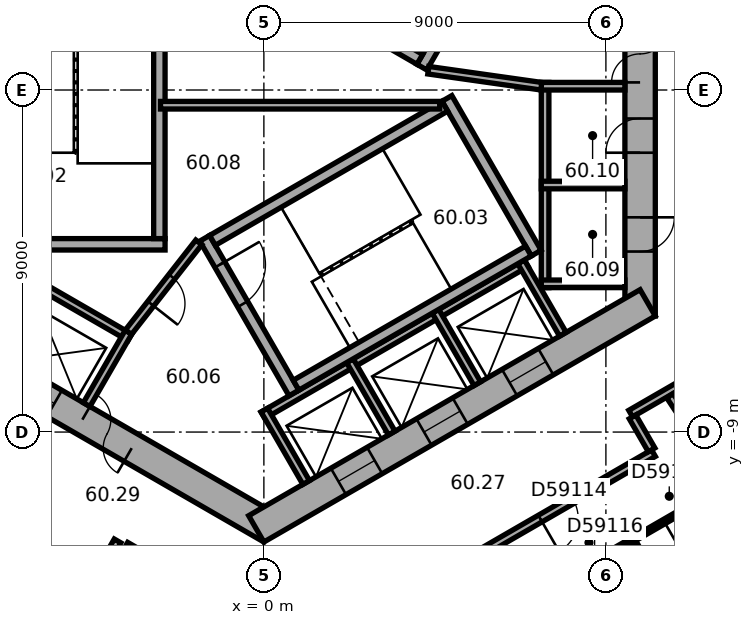
"""IFC4 building model, lengths in metres.
Left out: names, types, materials, properties, quantities, classifications, styles, units other than length and angle.
Written with IfcOpenShell. Run it as: python <this file> out.ifc"""

import sys

from ifc_helpers import new_model, si_unit, direction, frame, frame_2d, origin, place, context, subcontext, project, spatial, rectangle, extrude, element, fill, save


model = new_model("IFC4")
c1 = context("Model", 3, precision=1e-05, world=origin(), true_north=direction((0.0, 1.0)))
c2 = subcontext(c1, "Body", "Model", "MODEL_VIEW")
j1 = project(units=[si_unit("LENGTHUNIT", "METRE"), si_unit("PLANEANGLEUNIT", "RADIAN")], contexts=[c1])
p1 = place(None, origin())
s1 = spatial("IfcSite", under=j1, at=p1, CompositionType="ELEMENT")
p2 = place(p1, origin())
s2 = spatial("IfcBuilding", under=s1, at=p2, CompositionType="ELEMENT")
p3 = place(p2, frame((0.0, 0.0, 243.9)))
s3 = spatial("IfcBuildingStorey", under=s2, at=p3, CompositionType="ELEMENT", Elevation=243.9)
p4 = place(p3, frame((9.9, -5.947, 0.0), z_axis=(0.0, 0.0, 1.0), x_axis=(0.0, 1.0, 0.0)))
e1 = element("IfcWall", 1, at=p4, inside=s3, PredefinedType="SHEAR", context=c2, shape_type="SweptSolid", body=[
    extrude(rectangle(XDim=11.894, YDim=0.8, at=frame_2d((5.947, 0.0))), origin(), (0.0, 0.0, 1.0), 3.7),
])
p5 = place(p4, frame((6.147, 0.0, 0.0)))
e2 = element("IfcOpeningElement", 2, at=p5, cuts=e1, PredefinedType="OPENING", context=c2, shape_type="SweptSolid", body=[
    extrude(rectangle(XDim=1.5, YDim=2.1, at=frame_2d((0.75, 1.05))), frame((0.0, 0.41, 0.0), z_axis=(0.0, -1.0, 0.0), x_axis=(1.0, 0.0, 0.0)), (0.0, 0.0, 1.0), 0.82),
])
p6 = place(p4, frame((1.697, 0.0, 0.0)))
e3 = element("IfcOpeningElement", 3, at=p6, cuts=e1, PredefinedType="OPENING", context=c2, shape_type="SweptSolid", body=[
    extrude(rectangle(XDim=0.9, YDim=2.1, at=frame_2d((0.45, 1.05))), frame((0.0, 0.41, 0.0), z_axis=(0.0, -1.0, 0.0), x_axis=(1.0, 0.0, 0.0)), (0.0, 0.0, 1.0), 0.82),
])
p7 = place(p4, frame((4.297, 0.0, 0.0)))
e4 = element("IfcOpeningElement", 4, at=p7, cuts=e1, PredefinedType="OPENING", context=c2, shape_type="SweptSolid", body=[
    extrude(rectangle(XDim=0.9, YDim=2.1, at=frame_2d((0.45, 1.05))), frame((0.0, 0.41, 0.0), z_axis=(0.0, -1.0, 0.0), x_axis=(1.0, 0.0, 0.0)), (0.0, 0.0, 1.0), 0.82),
])
p8 = place(p3, frame((-10.1, -5.6, 0.0), z_axis=(0.0, 0.0, 1.0), x_axis=(0.866023897231, -0.500002609418, 0.0)))
e5 = element("IfcWall", 5, at=p8, inside=s3, PredefinedType="SHEAR", context=c2, shape_type="SweptSolid", body=[
    extrude(rectangle(XDim=11.894, YDim=0.8, at=frame_2d((5.947, 0.0))), origin(), (0.0, 0.0, 1.0), 3.7),
])
p9 = place(p8, frame((6.147, 0.0, 0.0)))
e6 = element("IfcOpeningElement", 6, at=p9, cuts=e5, PredefinedType="OPENING", context=c2, shape_type="SweptSolid", body=[
    extrude(rectangle(XDim=1.5, YDim=2.1, at=frame_2d((0.75, 1.05))), frame((0.0, 0.41, 0.0), z_axis=(0.0, -1.0, 0.0), x_axis=(1.0, 0.0, 0.0)), (0.0, 0.0, 1.0), 0.82),
])
p10 = place(p8, frame((1.597, 0.0, 0.0)))
e7 = element("IfcOpeningElement", 7, at=p10, cuts=e5, PredefinedType="OPENING", context=c2, shape_type="SweptSolid", body=[
    extrude(rectangle(XDim=1.1, YDim=2.1, at=frame_2d((0.55, 1.05))), frame((0.0, 0.41, 0.0), z_axis=(0.0, -1.0, 0.0), x_axis=(1.0, 0.0, 0.0)), (0.0, 0.0, 1.0), 0.82),
])
p11 = place(p8, frame((4.197, 0.0, 0.0)))
e8 = element("IfcOpeningElement", 8, at=p11, cuts=e5, PredefinedType="OPENING", context=c2, shape_type="SweptSolid", body=[
    extrude(rectangle(XDim=1.1, YDim=2.1, at=frame_2d((0.55, 1.05))), frame((0.0, 0.41, 0.0), z_axis=(0.0, -1.0, 0.0), x_axis=(1.0, 0.0, 0.0)), (0.0, 0.0, 1.0), 0.82),
])
p12 = place(p3, frame((-0.2, -11.547, 0.0), z_axis=(0.0, 0.0, 1.0), x_axis=(0.866023897231, 0.500002609418, 0.0)))
e9 = element("IfcWall", 9, at=p12, inside=s3, PredefinedType="SHEAR", context=c2, shape_type="SweptSolid", body=[
    extrude(rectangle(XDim=11.894, YDim=0.8, at=frame_2d((5.947, 0.0))), origin(), (0.0, 0.0, 1.0), 3.7),
])
p13 = place(p12, frame((2.497, 0.0, 0.0)))
e10 = element("IfcOpeningElement", 10, at=p13, cuts=e9, PredefinedType="OPENING", context=c2, shape_type="SweptSolid", body=[
    extrude(rectangle(XDim=1.1, YDim=2.1, at=frame_2d((0.55, 1.05))), frame((0.0, 0.41, 0.0), z_axis=(0.0, -1.0, 0.0), x_axis=(1.0, 0.0, 0.0)), (0.0, 0.0, 1.0), 0.82),
])
p14 = place(p12, frame((5.097, 0.0, 0.0)))
e11 = element("IfcOpeningElement", 11, at=p14, cuts=e9, PredefinedType="OPENING", context=c2, shape_type="SweptSolid", body=[
    extrude(rectangle(XDim=1.1, YDim=2.1, at=frame_2d((0.55, 1.05))), frame((0.0, 0.41, 0.0), z_axis=(0.0, -1.0, 0.0), x_axis=(1.0, 0.0, 0.0)), (0.0, 0.0, 1.0), 0.82),
])
p15 = place(p12, frame((7.697, 0.0, 0.0)))
e12 = element("IfcOpeningElement", 12, at=p15, cuts=e9, PredefinedType="OPENING", context=c2, shape_type="SweptSolid", body=[
    extrude(rectangle(XDim=1.1, YDim=2.1, at=frame_2d((0.55, 1.05))), frame((0.0, 0.41, 0.0), z_axis=(0.0, -1.0, 0.0), x_axis=(1.0, 0.0, 0.0)), (0.0, 0.0, 1.0), 0.82),
])
p16 = place(p3, frame((7.4, -5.2, 0.0), z_axis=(0.0, 0.0, 1.0), x_axis=(0.0, 1.0, 0.0)))
e13 = element("IfcWall", 13, at=p16, inside=s3, PredefinedType="PARTITIONING", context=c2, shape_type="SweptSolid", body=[
    extrude(rectangle(XDim=5.4, YDim=0.2, at=frame_2d((2.7, 0.0))), origin(), (0.0, 0.0, 1.0), 3.42),
])
for number, where, z_axis, x_axis in (
    (14, (7.3, -5.1, 0.0), (0.0, 0.0, 1.0), (1.0, 0.0, 0.0)),
    (15, (7.3, -2.5, 0.0), (0.0, 0.0, 1.0), (1.0, 0.0, 0.0)),
    (16, (7.3, 0.1, 0.0), (0.0, 0.0, 1.0), (1.0, 0.0, 0.0)),
):
    element("IfcWall", number, at=place(p3, frame(where, z_axis=z_axis, x_axis=x_axis)), inside=s3, PredefinedType="PARTITIONING", context=c2, shape_type="SweptSolid", body=[
        extrude(rectangle(XDim=2.2, YDim=0.2, at=frame_2d((1.1, 0.0))), origin(), (0.0, 0.0, 1.0), 3.42),
    ])
p17 = place(p3, frame((-8.203, -3.809, 0.0), z_axis=(0.0, 0.0, 1.0), x_axis=(0.866028230842, -0.499995103361, 0.0)))
e17 = element("IfcWall", 17, at=p17, inside=s3, PredefinedType="PARTITIONING", context=c2, shape_type="SweptSolid", body=[
    extrude(rectangle(XDim=5.4, YDim=0.2, at=frame_2d((2.7, 0.0))), origin(), (0.0, 0.0, 1.0), 3.42),
])
p18 = place(p3, frame((-3.563, -6.372, 0.0), z_axis=(0.0, 0.0, 1.0), x_axis=(-0.499994660107, -0.866028486751, 0.0)))
e18 = element("IfcWall", 18, at=p18, inside=s3, PredefinedType="PARTITIONING", context=c2, shape_type="SweptSolid", body=[
    extrude(rectangle(XDim=2.2, YDim=0.2, at=frame_2d((1.1, 0.0))), origin(), (0.0, 0.0, 1.0), 3.42),
])
p19 = place(p3, frame((-0.024, -8.559, 0.0), z_axis=(0.0, 0.0, 1.0), x_axis=(0.866026010844, 0.49999894854, 0.0)))
e19 = element("IfcWall", 19, at=p19, inside=s3, PredefinedType="PARTITIONING", context=c2, shape_type="SweptSolid", body=[
    extrude(rectangle(XDim=8.0, YDim=0.2, at=frame_2d((4.0, 0.0))), origin(), (0.0, 0.0, 1.0), 3.42),
])
for number, where, z_axis, x_axis in (
    (20, (0.013, -8.422, 0.0), (0.0, 0.0, 1.0), (0.5, -0.866, 0.0)),
    (21, (2.264, -7.122, 0.0), (0.0, 0.0, 1.0), (0.5, -0.866, 0.0)),
    (22, (4.516, -5.822, 0.0), (0.0, 0.0, 1.0), (0.5, -0.866, 0.0)),
    (23, (6.768, -4.522, 0.0), (0.0, 0.0, 1.0), (0.5, -0.866, 0.0)),
):
    element("IfcWall", number, at=place(p3, frame(where, z_axis=z_axis, x_axis=x_axis)), inside=s3, PredefinedType="PARTITIONING", context=c2, shape_type="SweptSolid", body=[
        extrude(rectangle(XDim=2.2, YDim=0.2, at=frame_2d((1.1, 0.0))), origin(), (0.0, 0.0, 1.0), 3.42),
    ])
p20 = place(p3, frame((4.158, 0.602, 0.0), z_axis=(0.0, 0.0, 1.0), x_axis=(0.499977259774, 0.866038532462, 0.0)))
e24 = element("IfcWall", 24, at=p20, inside=s3, PredefinedType="SHEAR", context=c2, shape_type="SweptSolid", body=[
    extrude(rectangle(XDim=4.7, YDim=0.3, at=frame_2d((2.35, 0.0))), origin(), (0.0, 0.0, 1.0), 3.42),
])
p21 = place(p20, frame((0.8, 0.0, 0.0)))
e25 = element("IfcOpeningElement", 25, at=p21, cuts=e24, PredefinedType="OPENING", context=c2, shape_type="SweptSolid", body=[
    extrude(rectangle(XDim=1.2, YDim=2.1, at=frame_2d((0.6, 1.05))), frame((0.0, 0.16, 0.0), z_axis=(0.0, -1.0, 0.0), x_axis=(1.0, 0.0, 0.0)), (0.0, 0.0, 1.0), 0.32),
])
p22 = place(p3, frame((4.103, 0.807, 0.0), z_axis=(0.0, 0.0, 1.0), x_axis=(-0.866027801685, 0.499995846692, 0.0)))
e26 = element("IfcWall", 26, at=p22, inside=s3, PredefinedType="SHEAR", context=c2, shape_type="SweptSolid", body=[
    extrude(rectangle(XDim=7.06, YDim=0.3, at=frame_2d((3.53, 0.0))), origin(), (0.0, 0.0, 1.0), 3.42),
])
p23 = place(p3, frame((-2.6, -4.06, 0.0), z_axis=(0.0, 0.0, 1.0), x_axis=(-1.0, 0.0, 0.0)))
e27 = element("IfcWall", 27, at=p23, inside=s3, PredefinedType="SHEAR", context=c2, shape_type="SweptSolid", body=[
    extrude(rectangle(XDim=4.7, YDim=0.3, at=frame_2d((2.35, 0.0))), origin(), (0.0, 0.0, 1.0), 3.42),
])
p24 = place(p3, frame((-2.75, 3.15, 0.0), z_axis=(0.0, 0.0, 1.0), x_axis=(0.0, -1.0, 0.0)))
e28 = element("IfcWall", 28, at=p24, inside=s3, PredefinedType="SHEAR", context=c2, shape_type="SweptSolid", body=[
    extrude(rectangle(XDim=7.06, YDim=0.3, at=frame_2d((3.53, 0.0))), origin(), (0.0, 0.0, 1.0), 3.42),
])
p25 = place(p3, frame((-1.558, -3.902, 0.0), z_axis=(0.0, 0.0, 1.0), x_axis=(0.499977259774, -0.866038532462, 0.0)))
e29 = element("IfcWall", 29, at=p25, inside=s3, PredefinedType="SHEAR", context=c2, shape_type="SweptSolid", body=[
    extrude(rectangle(XDim=4.7, YDim=0.3, at=frame_2d((2.35, 0.0))), origin(), (0.0, 0.0, 1.0), 3.42),
])
p26 = place(p25, frame((0.8, 0.0, 0.0)))
e30 = element("IfcOpeningElement", 30, at=p26, cuts=e29, PredefinedType="OPENING", context=c2, shape_type="SweptSolid", body=[
    extrude(rectangle(XDim=1.2, YDim=2.1, at=frame_2d((0.6, 1.05))), frame((0.0, 0.16, 0.0), z_axis=(0.0, -1.0, 0.0), x_axis=(1.0, 0.0, 0.0)), (0.0, 0.0, 1.0), 0.32),
])
p27 = place(p3, frame((4.816, -0.222, 0.0), z_axis=(0.0, 0.0, 1.0), x_axis=(0.499977259774, -0.866038532462, 0.0)))
e31 = element("IfcWall", 31, at=p27, inside=s3, PredefinedType="SHEAR", context=c2, shape_type="SweptSolid", body=[
    extrude(rectangle(XDim=4.7, YDim=0.3, at=frame_2d((2.35, 0.0))), origin(), (0.0, 0.0, 1.0), 3.42),
])
for number, where, z_axis, x_axis in (
    (32, (-1.353, -3.957, 0.0), (0.0, 0.0, 1.0), (0.866, 0.5, 0.0)),
    (33, (0.847, -7.767, 0.0), (0.0, 0.0, 1.0), (0.866, 0.5, 0.0)),
):
    element("IfcWall", number, at=place(p3, frame(where, z_axis=z_axis, x_axis=x_axis)), inside=s3, PredefinedType="SHEAR", context=c2, shape_type="SweptSolid", body=[
        extrude(rectangle(XDim=7.06, YDim=0.3, at=frame_2d((3.53, 0.0))), origin(), (0.0, 0.0, 1.0), 3.42),
    ])
p28 = place(p3, frame((4.327, 0.521, 0.0), z_axis=(0.0, 0.0, 1.0), x_axis=(0.990124376366, -0.14019172346, 0.0)))
e34 = element("IfcWall", 34, at=p28, inside=s3, PredefinedType="PARTITIONING", context=c2, shape_type="SweptSolid", body=[
    extrude(rectangle(XDim=3.002, YDim=0.2, at=frame_2d((1.501, 0.0))), origin(), (0.0, 0.0, 1.0), 3.42),
])
p29 = place(p3, frame((-1.712, -4.008, 0.0), z_axis=(0.0, 0.0, 1.0), x_axis=(-0.616549420702, -0.787316208287, 0.0)))
e35 = element("IfcWall", 35, at=p29, inside=s3, PredefinedType="PARTITIONING", context=c2, shape_type="SweptSolid", body=[
    extrude(rectangle(XDim=3.002, YDim=0.2, at=frame_2d((1.501, 0.0))), origin(), (0.0, 0.0, 1.0), 3.42),
])
p30 = place(p29, frame((1.15, 0.0, 0.0)))
e36 = element("IfcOpeningElement", 36, at=p30, cuts=e35, PredefinedType="OPENING", context=c2, shape_type="SweptSolid", body=[
    extrude(rectangle(XDim=0.9, YDim=2.1, at=frame_2d((0.45, 1.05))), frame((0.0, 0.11, 0.0), z_axis=(0.0, -1.0, 0.0), x_axis=(1.0, 0.0, 0.0)), (0.0, 0.0, 1.0), 0.22),
])
p31 = place(p3, frame((-2.72, -0.4, 0.0), z_axis=(0.0, 0.0, 1.0), x_axis=(1.0, 0.0, 0.0)))
e37 = element("IfcWall", 37, at=p31, inside=s3, PredefinedType="PARTITIONING", context=c2, shape_type="SweptSolid", body=[
    extrude(rectangle(XDim=7.347, YDim=0.2, at=frame_2d((3.674, 0.0))), origin(), (0.0, 0.0, 1.0), 3.42),
])
p32 = place(p3, frame((-7.525, -18.23, 0.0), z_axis=(0.0, 0.0, 1.0), x_axis=(0.499983153418, 0.866035129944, 0.0)))
e38 = element("IfcWall", 38, at=p32, inside=s3, PredefinedType="PARTITIONING", context=c2, shape_type="SweptSolid", body=[
    extrude(rectangle(XDim=7.35, YDim=0.2, at=frame_2d((3.675, 0.0))), origin(), (0.0, 0.0, 1.0), 3.42),
])
p33 = place(p32, frame((3.175, 0.0, 0.0)))
e39 = element("IfcOpeningElement", 39, at=p33, cuts=e38, PredefinedType="OPENING", context=c2, shape_type="SweptSolid", body=[
    extrude(rectangle(XDim=1.0, YDim=2.1, at=frame_2d((0.5, 1.05))), frame((0.0, 0.11, 0.0), z_axis=(0.0, -1.0, 0.0), x_axis=(1.0, 0.0, 0.0)), (0.0, 0.0, 1.0), 0.22),
])
p34 = place(p3, frame((-3.634, -11.99, 0.0), z_axis=(0.0, 0.0, 1.0), x_axis=(0.866033392248, -0.499986163319, 0.0)))
e40 = element("IfcWall", 40, at=p34, inside=s3, PredefinedType="PARTITIONING", context=c2, shape_type="SweptSolid", body=[
    extrude(rectangle(XDim=3.099, YDim=0.2, at=frame_2d((1.549, 0.0))), origin(), (0.0, 0.0, 1.0), 3.42),
])
p35 = place(p3, frame((2.716, -13.906, 0.0), z_axis=(0.0, 0.0, 1.0), x_axis=(0.866040290674, 0.499974214264, 0.0)))
e41 = element("IfcWall", 41, at=p35, inside=s3, PredefinedType="PARTITIONING", context=c2, shape_type="SweptSolid", body=[
    extrude(rectangle(XDim=8.702, YDim=0.2, at=frame_2d((4.351, 0.0))), origin(), (0.0, 0.0, 1.0), 3.42),
])
p36 = place(p35, frame((5.26, 0.0, 0.0)))
e42 = element("IfcOpeningElement", 42, at=p36, cuts=e41, PredefinedType="OPENING", context=c2, shape_type="SweptSolid", body=[
    extrude(rectangle(XDim=1.0, YDim=2.1, at=frame_2d((0.5, 1.05))), frame((0.0, 0.11, 0.0), z_axis=(0.0, -1.0, 0.0), x_axis=(1.0, 0.0, 0.0)), (0.0, 0.0, 1.0), 0.22),
])
p37 = place(p3, frame((6.183, -13.867, 0.0), z_axis=(0.0, 0.0, 1.0), x_axis=(0.866031365477, 0.499989673903, 0.0)))
e43 = element("IfcWall", 43, at=p37, inside=s3, PredefinedType="PARTITIONING", context=c2, shape_type="SweptSolid", body=[
    extrude(rectangle(XDim=6.881, YDim=0.12, at=frame_2d((3.44, 0.0))), origin(), (0.0, 0.0, 1.0), 3.42),
])
p38 = place(p37, frame((0.5, 0.0, 0.0)))
e44 = element("IfcOpeningElement", 44, at=p38, cuts=e43, PredefinedType="OPENING", context=c2, shape_type="SweptSolid", body=[
    extrude(rectangle(XDim=1.0, YDim=2.1, at=frame_2d((0.5, 1.05))), frame((0.0, 0.07, 0.0), z_axis=(0.0, -1.0, 0.0), x_axis=(1.0, 0.0, 0.0)), (0.0, 0.0, 1.0), 0.14),
])
p39 = place(p37, frame((2.583, 0.0, 0.0)))
e45 = element("IfcOpeningElement", 45, at=p39, cuts=e43, PredefinedType="OPENING", context=c2, shape_type="SweptSolid", body=[
    extrude(rectangle(XDim=0.9, YDim=2.1, at=frame_2d((0.45, 1.05))), frame((0.0, 0.07, 0.0), z_axis=(0.0, -1.0, 0.0), x_axis=(1.0, 0.0, 0.0)), (0.0, 0.0, 1.0), 0.14),
])
p40 = place(p37, frame((5.023, 0.0, 0.0)))
e46 = element("IfcOpeningElement", 46, at=p40, cuts=e43, PredefinedType="OPENING", context=c2, shape_type="SweptSolid", body=[
    extrude(rectangle(XDim=0.9, YDim=2.1, at=frame_2d((0.45, 1.05))), frame((0.0, 0.07, 0.0), z_axis=(0.0, -1.0, 0.0), x_axis=(1.0, 0.0, 0.0)), (0.0, 0.0, 1.0), 0.14),
])
p41 = place(p3, frame((9.652, -8.515, 0.0), z_axis=(0.0, 0.0, 1.0), x_axis=(0.866020375458, 0.500008709215, 0.0)))
e47 = element("IfcWall", 47, at=p41, inside=s3, PredefinedType="PARTITIONING", context=c2, shape_type="SweptSolid", body=[
    extrude(rectangle(XDim=1.846, YDim=0.2, at=frame_2d((0.923, 0.0))), origin(), (0.0, 0.0, 1.0), 3.42),
])
p42 = place(p3, frame((10.202, -9.469, 0.0), z_axis=(0.0, 0.0, 1.0), x_axis=(-0.499968756647, 0.866043441391, 0.0)))
e48 = element("IfcWall", 48, at=p42, inside=s3, PredefinedType="PARTITIONING", context=c2, shape_type="SweptSolid", body=[
    extrude(rectangle(XDim=1.001, YDim=0.2, at=frame_2d((0.5, 0.0))), origin(), (0.0, 0.0, 1.0), 3.42),
])
p43 = place(p3, frame((11.87, -15.588, 0.0), z_axis=(0.0, 0.0, 1.0), x_axis=(-0.49999774064, 0.866026708223, 0.0)))
e49 = element("IfcWall", 49, at=p43, inside=s3, PredefinedType="PARTITIONING", context=c2, shape_type="SweptSolid", body=[
    extrude(rectangle(XDim=4.273, YDim=0.12, at=frame_2d((2.137, 0.0))), origin(), (0.0, 0.0, 1.0), 3.42),
])
p44 = place(p3, frame((14.517, -13.836, 0.0), z_axis=(0.0, 0.0, 1.0), x_axis=(-0.551938455794, 0.833884848775, 0.0)))
e50 = element("IfcWall", 50, at=p44, inside=s3, PredefinedType="PARTITIONING", context=c2, shape_type="SweptSolid", body=[
    extrude(rectangle(XDim=6.944, YDim=0.2, at=frame_2d((3.472, 0.0))), origin(), (0.0, 0.0, 1.0), 2.87),
])
p45 = place(p5, origin())
e51 = element("IfcDoor", 51, at=p45, inside=s3, OperationType="DOUBLE_DOOR_SINGLE_SWING", PredefinedType="DOOR", context=c2, shape_type="SweptSolid", body=[
    extrude(rectangle(XDim=1.5, YDim=2.1, at=frame_2d((0.75, 1.05))), frame((0.0, 0.025, 0.0), z_axis=(0.0, -1.0, 0.0), x_axis=(1.0, 0.0, 0.0)), (0.0, 0.0, 1.0), 0.05),
])
fill(e2, e51)
p46 = place(p9, origin())
e52 = element("IfcDoor", 52, at=p46, inside=s3, OperationType="DOUBLE_DOOR_SINGLE_SWING", PredefinedType="DOOR", context=c2, shape_type="SweptSolid", body=[
    extrude(rectangle(XDim=1.5, YDim=2.1, at=frame_2d((0.75, 1.05))), frame((0.0, 0.025, 0.0), z_axis=(0.0, -1.0, 0.0), x_axis=(1.0, 0.0, 0.0)), (0.0, 0.0, 1.0), 0.05),
])
fill(e6, e52)
p47 = place(p26, origin())
e53 = element("IfcDoor", 53, at=p47, inside=s3, OperationType="SINGLE_SWING_RIGHT", PredefinedType="DOOR", context=c2, shape_type="SweptSolid", body=[
    extrude(rectangle(XDim=1.2, YDim=2.1, at=frame_2d((0.6, 1.05))), frame((0.0, 0.025, 0.0), z_axis=(0.0, -1.0, 0.0), x_axis=(1.0, 0.0, 0.0)), (0.0, 0.0, 1.0), 0.05),
])
fill(e30, e53)
p48 = place(p30, origin())
e54 = element("IfcDoor", 54, at=p48, inside=s3, OperationType="SINGLE_SWING_LEFT", PredefinedType="DOOR", context=c2, shape_type="SweptSolid", body=[
    extrude(rectangle(XDim=0.9, YDim=2.1, at=frame_2d((0.45, 1.05))), frame((0.0, 0.025, 0.0), z_axis=(0.0, -1.0, 0.0), x_axis=(1.0, 0.0, 0.0)), (0.0, 0.0, 1.0), 0.05),
])
fill(e36, e54)
p49 = place(p6, origin())
e55 = element("IfcDoor", 55, at=p49, inside=s3, OperationType="SINGLE_SWING_LEFT", PredefinedType="DOOR", context=c2, shape_type="SweptSolid", body=[
    extrude(rectangle(XDim=0.9, YDim=2.1, at=frame_2d((0.45, 1.05))), frame((0.0, 0.025, 0.0), z_axis=(0.0, -1.0, 0.0), x_axis=(1.0, 0.0, 0.0)), (0.0, 0.0, 1.0), 0.05),
])
fill(e3, e55)
p50 = place(p7, origin())
e56 = element("IfcDoor", 56, at=p50, inside=s3, OperationType="SINGLE_SWING_LEFT", PredefinedType="DOOR", context=c2, shape_type="SweptSolid", body=[
    extrude(rectangle(XDim=0.9, YDim=2.1, at=frame_2d((0.45, 1.05))), frame((0.0, 0.025, 0.0), z_axis=(0.0, -1.0, 0.0), x_axis=(1.0, 0.0, 0.0)), (0.0, 0.0, 1.0), 0.05),
])
fill(e4, e56)
p51 = place(p11, origin())
e57 = element("IfcDoor", 57, at=p51, inside=s3, OperationType="DOUBLE_DOOR_SLIDING", PredefinedType="DOOR", context=c2, shape_type="SweptSolid", body=[
    extrude(rectangle(XDim=1.1, YDim=2.1, at=frame_2d((0.55, 1.05))), frame((0.0, 0.025, 0.0), z_axis=(0.0, -1.0, 0.0), x_axis=(1.0, 0.0, 0.0)), (0.0, 0.0, 1.0), 0.05),
])
fill(e8, e57)
p52 = place(p13, origin())
e58 = element("IfcDoor", 58, at=p52, inside=s3, OperationType="DOUBLE_DOOR_SLIDING", PredefinedType="DOOR", context=c2, shape_type="SweptSolid", body=[
    extrude(rectangle(XDim=1.1, YDim=2.1, at=frame_2d((0.55, 1.05))), frame((0.0, 0.025, 0.0), z_axis=(0.0, -1.0, 0.0), x_axis=(1.0, 0.0, 0.0)), (0.0, 0.0, 1.0), 0.05),
])
fill(e10, e58)
p53 = place(p14, origin())
e59 = element("IfcDoor", 59, at=p53, inside=s3, OperationType="DOUBLE_DOOR_SLIDING", PredefinedType="DOOR", context=c2, shape_type="SweptSolid", body=[
    extrude(rectangle(XDim=1.1, YDim=2.1, at=frame_2d((0.55, 1.05))), frame((0.0, 0.025, 0.0), z_axis=(0.0, -1.0, 0.0), x_axis=(1.0, 0.0, 0.0)), (0.0, 0.0, 1.0), 0.05),
])
fill(e11, e59)
p54 = place(p15, origin())
e60 = element("IfcDoor", 60, at=p54, inside=s3, OperationType="DOUBLE_DOOR_SLIDING", PredefinedType="DOOR", context=c2, shape_type="SweptSolid", body=[
    extrude(rectangle(XDim=1.1, YDim=2.1, at=frame_2d((0.55, 1.05))), frame((0.0, 0.025, 0.0), z_axis=(0.0, -1.0, 0.0), x_axis=(1.0, 0.0, 0.0)), (0.0, 0.0, 1.0), 0.05),
])
fill(e12, e60)
p55 = place(p36, origin())
e61 = element("IfcDoor", 61, at=p55, inside=s3, OperationType="SINGLE_SWING_LEFT", PredefinedType="DOOR", context=c2, shape_type="SweptSolid", body=[
    extrude(rectangle(XDim=1.0, YDim=2.1, at=frame_2d((0.5, 1.05))), frame((0.0, 0.025, 0.0), z_axis=(0.0, -1.0, 0.0), x_axis=(1.0, 0.0, 0.0)), (0.0, 0.0, 1.0), 0.05),
])
fill(e42, e61)
p56 = place(p40, origin())
e62 = element("IfcDoor", 62, at=p56, inside=s3, OperationType="SINGLE_SWING_LEFT", PredefinedType="DOOR", context=c2, shape_type="SweptSolid", body=[
    extrude(rectangle(XDim=0.9, YDim=2.1, at=frame_2d((0.45, 1.05))), frame((0.0, 0.025, 0.0), z_axis=(0.0, -1.0, 0.0), x_axis=(1.0, 0.0, 0.0)), (0.0, 0.0, 1.0), 0.05),
])
fill(e46, e62)
save(model, sys.argv[1])
